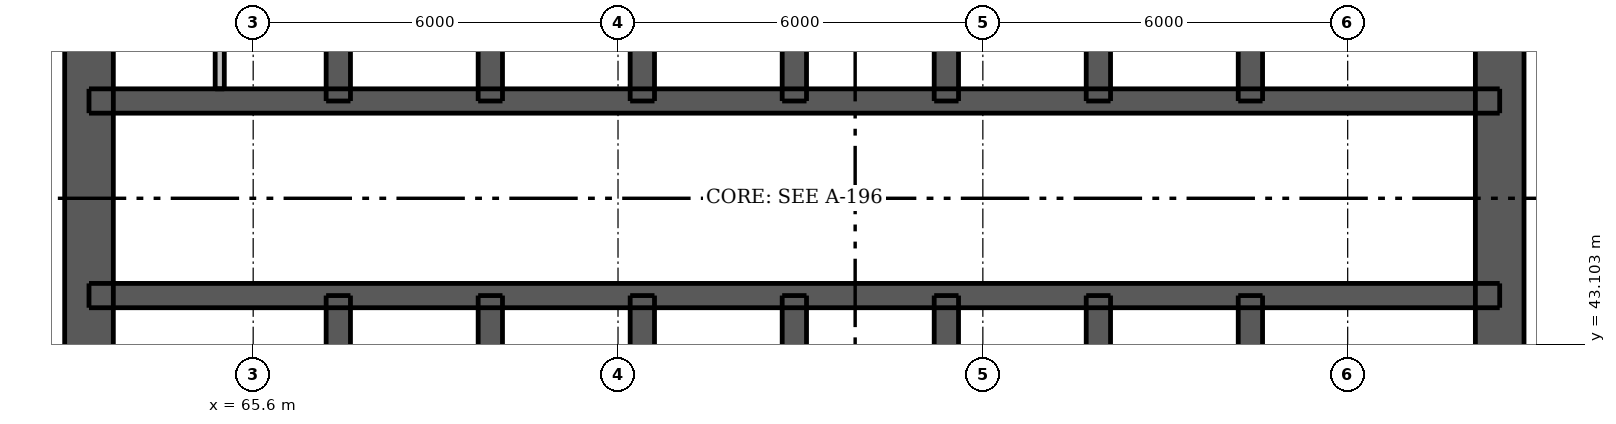
"""IFC4 building model, lengths in metres.
Left out: names, types, materials, properties, quantities, classifications, styles, units other than length and angle.
Written with IfcOpenShell. Run it as: python <this file> out.ifc"""

import sys

from ifc_helpers import new_model, si_unit, direction, frame, frame_2d, origin, place, context, subcontext, project, spatial, rectangle, extrude, element, fill, save


model = new_model("IFC4")
c1 = context("Model", 3, precision=1e-05, world=origin(), true_north=direction((0.0, 1.0)))
c2 = subcontext(c1, "Body", "Model", "MODEL_VIEW")
j1 = project(units=[si_unit("LENGTHUNIT", "METRE"), si_unit("PLANEANGLEUNIT", "RADIAN")], contexts=[c1])
p1 = place(None, origin())
s1 = spatial("IfcSite", under=j1, at=p1, CompositionType="ELEMENT")
p2 = place(p1, origin())
s2 = spatial("IfcBuilding", under=s1, at=p2, CompositionType="ELEMENT")
p3 = place(p2, frame((0.0, 0.0, 118.3)))
s3 = spatial("IfcBuildingStorey", under=s2, at=p3, CompositionType="ELEMENT", Elevation=118.3)
p4 = place(p3, frame((62.9, 33.5, 0.0), z_axis=(0.0, 0.0, 1.0), x_axis=(0.0, 1.0, 0.0)))
e1 = element("IfcWall", 1, at=p4, inside=s3, PredefinedType="SHEAR", context=c2, shape_type="SweptSolid", body=[
    extrude(rectangle(XDim=24.0, YDim=0.8, at=frame_2d((12.0, 0.0))), origin(), (0.0, 0.0, 1.0), 3.05),
])
p5 = place(p4, frame((11.2, 0.0, 0.0)))
e2 = element("IfcOpeningElement", 2, at=p5, cuts=e1, PredefinedType="OPENING", context=c2, shape_type="SweptSolid", body=[
    extrude(rectangle(XDim=1.6, YDim=2.1, at=frame_2d((0.8, 1.05))), frame((0.0, 0.41, 0.0), z_axis=(0.0, -1.0, 0.0), x_axis=(1.0, 0.0, 0.0)), (0.0, 0.0, 1.0), 0.82),
])
p6 = place(p3, frame((86.1, 33.5, 0.0), z_axis=(0.0, 0.0, 1.0), x_axis=(0.0, 1.0, 0.0)))
e3 = element("IfcWall", 3, at=p6, inside=s3, PredefinedType="SHEAR", context=c2, shape_type="SweptSolid", body=[
    extrude(rectangle(XDim=24.0, YDim=0.8, at=frame_2d((12.0, 0.0))), origin(), (0.0, 0.0, 1.0), 3.05),
])
p7 = place(p6, frame((11.2, 0.0, 0.0)))
e4 = element("IfcOpeningElement", 4, at=p7, cuts=e3, PredefinedType="OPENING", context=c2, shape_type="SweptSolid", body=[
    extrude(rectangle(XDim=1.6, YDim=2.1, at=frame_2d((0.8, 1.05))), frame((0.0, 0.41, 0.0), z_axis=(0.0, -1.0, 0.0), x_axis=(1.0, 0.0, 0.0)), (0.0, 0.0, 1.0), 0.82),
])
p8 = place(p3, frame((62.9, 43.9, 0.0), z_axis=(0.0, 0.0, 1.0), x_axis=(1.0, 0.0, 0.0)))
e5 = element("IfcWall", 5, at=p8, inside=s3, PredefinedType="SHEAR", context=c2, shape_type="SweptSolid", body=[
    extrude(rectangle(XDim=23.2, YDim=0.4, at=frame_2d((11.6, 0.0))), origin(), (0.0, 0.0, 1.0), 3.05),
])
p9 = place(p8, frame((1.7, 0.0, 0.0)))
e6 = element("IfcOpeningElement", 6, at=p9, cuts=e5, PredefinedType="OPENING", context=c2, shape_type="SweptSolid", body=[
    extrude(rectangle(XDim=0.9, YDim=2.1, at=frame_2d((0.45, 1.05))), frame((0.0, 0.21, 0.0), z_axis=(0.0, -1.0, 0.0), x_axis=(1.0, 0.0, 0.0)), (0.0, 0.0, 1.0), 0.42),
])
p10 = place(p8, frame((20.6, 0.0, 0.0)))
e7 = element("IfcOpeningElement", 7, at=p10, cuts=e5, PredefinedType="OPENING", context=c2, shape_type="SweptSolid", body=[
    extrude(rectangle(XDim=0.9, YDim=2.1, at=frame_2d((0.45, 1.05))), frame((0.0, 0.21, 0.0), z_axis=(0.0, -1.0, 0.0), x_axis=(1.0, 0.0, 0.0)), (0.0, 0.0, 1.0), 0.42),
])
p11 = place(p8, frame((4.8, 0.0, 0.0)))
e8 = element("IfcOpeningElement", 8, at=p11, cuts=e5, PredefinedType="OPENING", context=c2, shape_type="SweptSolid", body=[
    extrude(rectangle(XDim=1.1, YDim=2.1, at=frame_2d((0.55, 1.05))), frame((0.0, 0.21, 0.0), z_axis=(0.0, -1.0, 0.0), x_axis=(1.0, 0.0, 0.0)), (0.0, 0.0, 1.0), 0.42),
])
p12 = place(p8, frame((7.3, 0.0, 0.0)))
e9 = element("IfcOpeningElement", 9, at=p12, cuts=e5, PredefinedType="OPENING", context=c2, shape_type="SweptSolid", body=[
    extrude(rectangle(XDim=1.1, YDim=2.1, at=frame_2d((0.55, 1.05))), frame((0.0, 0.21, 0.0), z_axis=(0.0, -1.0, 0.0), x_axis=(1.0, 0.0, 0.0)), (0.0, 0.0, 1.0), 0.42),
])
p13 = place(p8, frame((9.8, 0.0, 0.0)))
e10 = element("IfcOpeningElement", 10, at=p13, cuts=e5, PredefinedType="OPENING", context=c2, shape_type="SweptSolid", body=[
    extrude(rectangle(XDim=1.1, YDim=2.1, at=frame_2d((0.55, 1.05))), frame((0.0, 0.21, 0.0), z_axis=(0.0, -1.0, 0.0), x_axis=(1.0, 0.0, 0.0)), (0.0, 0.0, 1.0), 0.42),
])
p14 = place(p8, frame((12.3, 0.0, 0.0)))
e11 = element("IfcOpeningElement", 11, at=p14, cuts=e5, PredefinedType="OPENING", context=c2, shape_type="SweptSolid", body=[
    extrude(rectangle(XDim=1.1, YDim=2.1, at=frame_2d((0.55, 1.05))), frame((0.0, 0.21, 0.0), z_axis=(0.0, -1.0, 0.0), x_axis=(1.0, 0.0, 0.0)), (0.0, 0.0, 1.0), 0.42),
])
p15 = place(p8, frame((14.8, 0.0, 0.0)))
e12 = element("IfcOpeningElement", 12, at=p15, cuts=e5, PredefinedType="OPENING", context=c2, shape_type="SweptSolid", body=[
    extrude(rectangle(XDim=1.1, YDim=2.1, at=frame_2d((0.55, 1.05))), frame((0.0, 0.21, 0.0), z_axis=(0.0, -1.0, 0.0), x_axis=(1.0, 0.0, 0.0)), (0.0, 0.0, 1.0), 0.42),
])
p16 = place(p8, frame((17.3, 0.0, 0.0)))
e13 = element("IfcOpeningElement", 13, at=p16, cuts=e5, PredefinedType="OPENING", context=c2, shape_type="SweptSolid", body=[
    extrude(rectangle(XDim=1.1, YDim=2.1, at=frame_2d((0.55, 1.05))), frame((0.0, 0.21, 0.0), z_axis=(0.0, -1.0, 0.0), x_axis=(1.0, 0.0, 0.0)), (0.0, 0.0, 1.0), 0.42),
])
p17 = place(p3, frame((62.9, 47.1, 0.0), z_axis=(0.0, 0.0, 1.0), x_axis=(1.0, 0.0, 0.0)))
e14 = element("IfcWall", 14, at=p17, inside=s3, PredefinedType="SHEAR", context=c2, shape_type="SweptSolid", body=[
    extrude(rectangle(XDim=23.2, YDim=0.4, at=frame_2d((11.6, 0.0))), origin(), (0.0, 0.0, 1.0), 3.05),
])
p18 = place(p17, frame((0.825, 0.0, 0.0)))
e15 = element("IfcOpeningElement", 15, at=p18, cuts=e14, PredefinedType="OPENING", context=c2, shape_type="SweptSolid", body=[
    extrude(rectangle(XDim=0.9, YDim=2.1, at=frame_2d((0.45, 1.05))), frame((0.0, 0.21, 0.0), z_axis=(0.0, -1.0, 0.0), x_axis=(1.0, 0.0, 0.0)), (0.0, 0.0, 1.0), 0.42),
])
p19 = place(p17, frame((2.575, 0.0, 0.0)))
e16 = element("IfcOpeningElement", 16, at=p19, cuts=e14, PredefinedType="OPENING", context=c2, shape_type="SweptSolid", body=[
    extrude(rectangle(XDim=0.9, YDim=2.1, at=frame_2d((0.45, 1.05))), frame((0.0, 0.21, 0.0), z_axis=(0.0, -1.0, 0.0), x_axis=(1.0, 0.0, 0.0)), (0.0, 0.0, 1.0), 0.42),
])
p20 = place(p17, frame((20.6, 0.0, 0.0)))
e17 = element("IfcOpeningElement", 17, at=p20, cuts=e14, PredefinedType="OPENING", context=c2, shape_type="SweptSolid", body=[
    extrude(rectangle(XDim=0.9, YDim=2.1, at=frame_2d((0.45, 1.05))), frame((0.0, 0.21, 0.0), z_axis=(0.0, -1.0, 0.0), x_axis=(1.0, 0.0, 0.0)), (0.0, 0.0, 1.0), 0.42),
])
p21 = place(p3, frame((67.0, 33.9, 0.0), z_axis=(0.0, 0.0, 1.0), x_axis=(0.0, 1.0, 0.0)))
e18 = element("IfcWall", 18, at=p21, inside=s3, PredefinedType="SHEAR", context=c2, shape_type="SweptSolid", body=[
    extrude(rectangle(XDim=10.0, YDim=0.4, at=frame_2d((5.0, 0.0))), origin(), (0.0, 0.0, 1.0), 3.05),
])
p22 = place(p21, frame((0.6, 0.0, 0.0)))
e19 = element("IfcOpeningElement", 19, at=p22, cuts=e18, PredefinedType="OPENING", context=c2, shape_type="SweptSolid", body=[
    extrude(rectangle(XDim=1.1, YDim=2.1, at=frame_2d((0.55, 1.05))), frame((0.0, 0.21, 0.0), z_axis=(0.0, -1.0, 0.0), x_axis=(1.0, 0.0, 0.0)), (0.0, 0.0, 1.0), 0.42),
])
for number, where, z_axis, x_axis in (
    (20, (67.0, 47.1, 0.0), (0.0, 0.0, 1.0), (0.0, 1.0, 0.0)),
    (21, (82.0, 33.9, 0.0), (0.0, 0.0, 1.0), (0.0, 1.0, 0.0)),
    (22, (82.0, 47.1, 0.0), (0.0, 0.0, 1.0), (0.0, 1.0, 0.0)),
):
    element("IfcWall", number, at=place(p3, frame(where, z_axis=z_axis, x_axis=x_axis)), inside=s3, PredefinedType="SHEAR", context=c2, shape_type="SweptSolid", body=[
        extrude(rectangle(XDim=10.0, YDim=0.4, at=frame_2d((5.0, 0.0))), origin(), (0.0, 0.0, 1.0), 3.05),
    ])
for number, where, z_axis, x_axis in (
    (23, (69.5, 41.0, 0.0), (0.0, 0.0, 1.0), (0.0, 1.0, 0.0)),
    (24, (69.5, 47.1, 0.0), (0.0, 0.0, 1.0), (0.0, 1.0, 0.0)),
    (25, (72.0, 41.0, 0.0), (0.0, 0.0, 1.0), (0.0, 1.0, 0.0)),
    (26, (72.0, 47.1, 0.0), (0.0, 0.0, 1.0), (0.0, 1.0, 0.0)),
    (27, (74.5, 41.0, 0.0), (0.0, 0.0, 1.0), (0.0, 1.0, 0.0)),
    (28, (74.5, 47.1, 0.0), (0.0, 0.0, 1.0), (0.0, 1.0, 0.0)),
    (29, (77.0, 41.0, 0.0), (0.0, 0.0, 1.0), (0.0, 1.0, 0.0)),
    (30, (77.0, 47.1, 0.0), (0.0, 0.0, 1.0), (0.0, 1.0, 0.0)),
    (31, (79.5, 41.0, 0.0), (0.0, 0.0, 1.0), (0.0, 1.0, 0.0)),
    (32, (79.5, 47.1, 0.0), (0.0, 0.0, 1.0), (0.0, 1.0, 0.0)),
):
    element("IfcWall", number, at=place(p3, frame(where, z_axis=z_axis, x_axis=x_axis)), inside=s3, PredefinedType="SHEAR", context=c2, shape_type="SweptSolid", body=[
        extrude(rectangle(XDim=2.9, YDim=0.4, at=frame_2d((1.45, 0.0))), origin(), (0.0, 0.0, 1.0), 3.05),
    ])
p23 = place(p3, frame((65.05, 47.3, 0.0), z_axis=(0.0, 0.0, 1.0), x_axis=(0.0, 1.0, 0.0)))
e33 = element("IfcWall", 33, at=p23, inside=s3, PredefinedType="PLUMBINGWALL", context=c2, shape_type="SweptSolid", body=[
    extrude(rectangle(XDim=2.5, YDim=0.15, at=frame_2d((1.25, 0.0))), origin(), (0.0, 0.0, 1.0), 3.05),
])
p24 = place(p5, origin())
e34 = element("IfcDoor", 34, at=p24, inside=s3, OperationType="DOUBLE_DOOR_SINGLE_SWING", PredefinedType="DOOR", context=c2, shape_type="SweptSolid", body=[
    extrude(rectangle(XDim=1.6, YDim=2.1, at=frame_2d((0.8, 1.05))), frame((0.0, -0.337, 0.0), z_axis=(0.0, -1.0, 0.0), x_axis=(1.0, 0.0, 0.0)), (0.0, 0.0, 1.0), 0.05),
])
fill(e2, e34)
p25 = place(p7, origin())
e35 = element("IfcDoor", 35, at=p25, inside=s3, OperationType="DOUBLE_DOOR_SINGLE_SWING", PredefinedType="DOOR", context=c2, shape_type="SweptSolid", body=[
    extrude(rectangle(XDim=1.6, YDim=2.1, at=frame_2d((0.8, 1.05))), frame((0.0, 0.388, 0.0), z_axis=(0.0, -1.0, 0.0), x_axis=(1.0, 0.0, 0.0)), (0.0, 0.0, 1.0), 0.05),
])
fill(e4, e35)
p26 = place(p9, origin())
e36 = element("IfcDoor", 36, at=p26, inside=s3, OperationType="SINGLE_SWING_LEFT", PredefinedType="DOOR", context=c2, shape_type="SweptSolid", body=[
    extrude(rectangle(XDim=0.9, YDim=2.1, at=frame_2d((0.45, 1.05))), frame((0.0, -0.138, 0.0), z_axis=(0.0, -1.0, 0.0), x_axis=(1.0, 0.0, 0.0)), (0.0, 0.0, 1.0), 0.05),
])
fill(e6, e36)
p27 = place(p10, origin())
e37 = element("IfcDoor", 37, at=p27, inside=s3, OperationType="SINGLE_SWING_LEFT", PredefinedType="DOOR", context=c2, shape_type="SweptSolid", body=[
    extrude(rectangle(XDim=0.9, YDim=2.1, at=frame_2d((0.45, 1.05))), frame((0.0, -0.138, 0.0), z_axis=(0.0, -1.0, 0.0), x_axis=(1.0, 0.0, 0.0)), (0.0, 0.0, 1.0), 0.05),
])
fill(e7, e37)
p28 = place(p18, origin())
e38 = element("IfcDoor", 38, at=p28, inside=s3, OperationType="SINGLE_SWING_LEFT", PredefinedType="DOOR", context=c2, shape_type="SweptSolid", body=[
    extrude(rectangle(XDim=0.9, YDim=2.1, at=frame_2d((0.45, 1.05))), frame((0.0, 0.188, 0.0), z_axis=(0.0, -1.0, 0.0), x_axis=(1.0, 0.0, 0.0)), (0.0, 0.0, 1.0), 0.05),
])
fill(e15, e38)
p29 = place(p19, origin())
e39 = element("IfcDoor", 39, at=p29, inside=s3, OperationType="SINGLE_SWING_RIGHT", PredefinedType="DOOR", context=c2, shape_type="SweptSolid", body=[
    extrude(rectangle(XDim=0.9, YDim=2.1, at=frame_2d((0.45, 1.05))), frame((0.0, 0.188, 0.0), z_axis=(0.0, -1.0, 0.0), x_axis=(1.0, 0.0, 0.0)), (0.0, 0.0, 1.0), 0.05),
])
fill(e16, e39)
p30 = place(p20, origin())
e40 = element("IfcDoor", 40, at=p30, inside=s3, OperationType="SINGLE_SWING_LEFT", PredefinedType="DOOR", context=c2, shape_type="SweptSolid", body=[
    extrude(rectangle(XDim=0.9, YDim=2.1, at=frame_2d((0.45, 1.05))), frame((0.0, 0.188, 0.0), z_axis=(0.0, -1.0, 0.0), x_axis=(1.0, 0.0, 0.0)), (0.0, 0.0, 1.0), 0.05),
])
fill(e17, e40)
p31 = place(p11, origin())
e41 = element("IfcDoor", 41, at=p31, inside=s3, OperationType="DOUBLE_DOOR_SLIDING", PredefinedType="DOOR", context=c2, shape_type="SweptSolid", body=[
    extrude(rectangle(XDim=1.1, YDim=2.1, at=frame_2d((0.55, 1.05))), frame((0.0, 0.025, 0.0), z_axis=(0.0, -1.0, 0.0), x_axis=(1.0, 0.0, 0.0)), (0.0, 0.0, 1.0), 0.05),
])
fill(e8, e41)
p32 = place(p12, origin())
e42 = element("IfcDoor", 42, at=p32, inside=s3, OperationType="DOUBLE_DOOR_SLIDING", PredefinedType="DOOR", context=c2, shape_type="SweptSolid", body=[
    extrude(rectangle(XDim=1.1, YDim=2.1, at=frame_2d((0.55, 1.05))), frame((0.0, 0.025, 0.0), z_axis=(0.0, -1.0, 0.0), x_axis=(1.0, 0.0, 0.0)), (0.0, 0.0, 1.0), 0.05),
])
fill(e9, e42)
p33 = place(p13, origin())
e43 = element("IfcDoor", 43, at=p33, inside=s3, OperationType="DOUBLE_DOOR_SLIDING", PredefinedType="DOOR", context=c2, shape_type="SweptSolid", body=[
    extrude(rectangle(XDim=1.1, YDim=2.1, at=frame_2d((0.55, 1.05))), frame((0.0, 0.025, 0.0), z_axis=(0.0, -1.0, 0.0), x_axis=(1.0, 0.0, 0.0)), (0.0, 0.0, 1.0), 0.05),
])
fill(e10, e43)
p34 = place(p14, origin())
e44 = element("IfcDoor", 44, at=p34, inside=s3, OperationType="DOUBLE_DOOR_SLIDING", PredefinedType="DOOR", context=c2, shape_type="SweptSolid", body=[
    extrude(rectangle(XDim=1.1, YDim=2.1, at=frame_2d((0.55, 1.05))), frame((0.0, 0.025, 0.0), z_axis=(0.0, -1.0, 0.0), x_axis=(1.0, 0.0, 0.0)), (0.0, 0.0, 1.0), 0.05),
])
fill(e11, e44)
p35 = place(p15, origin())
e45 = element("IfcDoor", 45, at=p35, inside=s3, OperationType="DOUBLE_DOOR_SLIDING", PredefinedType="DOOR", context=c2, shape_type="SweptSolid", body=[
    extrude(rectangle(XDim=1.1, YDim=2.1, at=frame_2d((0.55, 1.05))), frame((0.0, 0.025, 0.0), z_axis=(0.0, -1.0, 0.0), x_axis=(1.0, 0.0, 0.0)), (0.0, 0.0, 1.0), 0.05),
])
fill(e12, e45)
p36 = place(p16, origin())
e46 = element("IfcDoor", 46, at=p36, inside=s3, OperationType="DOUBLE_DOOR_SLIDING", PredefinedType="DOOR", context=c2, shape_type="SweptSolid", body=[
    extrude(rectangle(XDim=1.1, YDim=2.1, at=frame_2d((0.55, 1.05))), frame((0.0, 0.025, 0.0), z_axis=(0.0, -1.0, 0.0), x_axis=(1.0, 0.0, 0.0)), (0.0, 0.0, 1.0), 0.05),
])
fill(e13, e46)
save(model, sys.argv[1])
